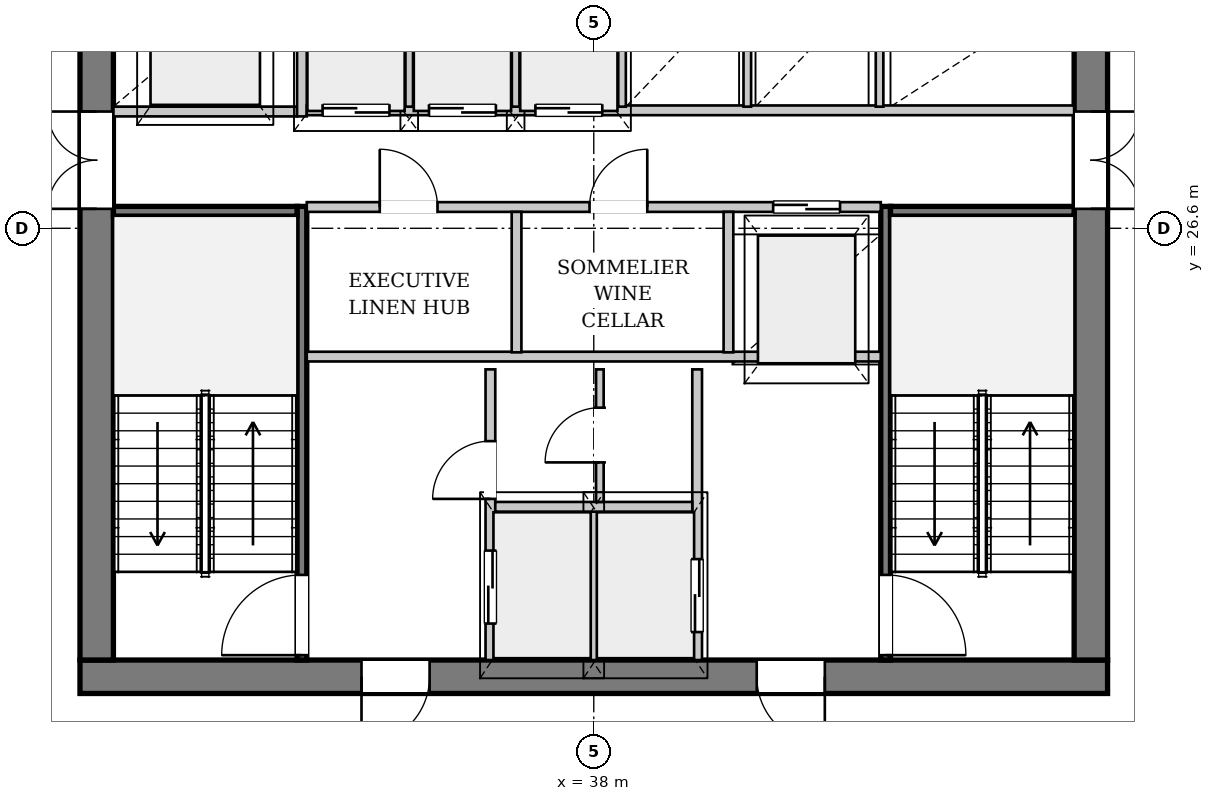
"""IFC4 building model, lengths in metres.
Left out: names, types, materials, properties, quantities, classifications, styles, units other than length and angle.
Written with IfcOpenShell. Run it as: python <this file> out.ifc"""

import sys

from ifc_helpers import new_model, si_unit, direction, frame, frame_2d, origin, place, context, subcontext, project, spatial, rectangle, extrude, source, transform, mapped, element, fill, save


model = new_model("IFC4")
c1 = context("Model", 3, precision=1e-05, world=origin(), true_north=direction((0.0, 1.0)))
c2 = subcontext(c1, "Body", "Model", "MODEL_VIEW")
j1 = project(units=[si_unit("LENGTHUNIT", "METRE"), si_unit("PLANEANGLEUNIT", "RADIAN")], contexts=[c1])
p1 = place(None, origin())
s1 = spatial("IfcSite", under=j1, at=p1, CompositionType="ELEMENT")
p2 = place(p1, origin())
s2 = spatial("IfcBuilding", under=s1, at=p2, CompositionType="ELEMENT")
p3 = place(p2, frame((0.0, 0.0, 171.45)))
s3 = spatial("IfcBuildingStorey", under=s2, at=p3, CompositionType="ELEMENT", Elevation=171.45)
p4 = place(p3, frame((52.993, 20.473, 0.0), z_axis=(0.0, 0.0, 1.0), x_axis=(-0.643470383852, -0.765471008664, 0.0)))
e1 = element("IfcWall", 1, at=p4, inside=s3, PredefinedType="SOLIDWALL", context=c2, shape_type="SweptSolid", body=[
    extrude(rectangle(XDim=23.409, YDim=0.32, at=frame_2d((11.705, 0.0))), origin(), (0.0, 0.0, 1.0), 2.722),
])
p5 = place(p4, frame((6.741, 0.0, 0.0)))
e2 = element("IfcOpeningElement", 2, at=p5, cuts=e1, PredefinedType="OPENING", context=c2, shape_type="SweptSolid", body=[
    extrude(rectangle(XDim=1.5, YDim=2.3, at=frame_2d((0.75, 1.15))), frame((0.0, 0.17, 0.0), z_axis=(0.0, -1.0, 0.0), x_axis=(1.0, 0.0, 0.0)), (0.0, 0.0, 1.0), 0.34),
])
p6 = place(p4, frame((16.023, 0.0, 0.252)))
e3 = element("IfcOpeningElement", 3, at=p6, cuts=e1, PredefinedType="OPENING", context=c2, shape_type="SweptSolid", body=[
    extrude(rectangle(XDim=2.6, YDim=2.35, at=frame_2d((1.3, 1.175))), frame((0.0, 0.17, 0.0), z_axis=(0.0, -1.0, 0.0), x_axis=(1.0, 0.0, 0.0)), (0.0, 0.0, 1.0), 0.34),
])
p7 = place(p3, frame((46.45, 19.225, 0.0), z_axis=(0.0, 0.0, 1.0), x_axis=(-1.0, 0.0, 0.0)))
e4 = element("IfcWall", 4, at=p7, inside=s3, PredefinedType="SHEAR", context=c2, shape_type="SweptSolid", body=[
    extrude(rectangle(XDim=16.9, YDim=0.55, at=frame_2d((8.45, 0.0))), origin(), (0.0, 0.0, 1.0), 3.33),
])
p8 = place(p7, frame((4.65, 0.0, 0.0)))
e5 = element("IfcOpeningElement", 5, at=p8, cuts=e4, PredefinedType="OPENING", context=c2, shape_type="SweptSolid", body=[
    extrude(rectangle(XDim=1.12, YDim=2.25, at=frame_2d((0.56, 1.125))), frame((0.0, 0.285, 0.0), z_axis=(0.0, -1.0, 0.0), x_axis=(1.0, 0.0, 0.0)), (0.0, 0.0, 1.0), 0.57),
])
p9 = place(p7, frame((11.15, 0.0, 0.0)))
e6 = element("IfcOpeningElement", 6, at=p9, cuts=e4, PredefinedType="OPENING", context=c2, shape_type="SweptSolid", body=[
    extrude(rectangle(XDim=1.12, YDim=2.25, at=frame_2d((0.56, 1.125))), frame((0.0, 0.285, 0.0), z_axis=(0.0, -1.0, 0.0), x_axis=(1.0, 0.0, 0.0)), (0.0, 0.0, 1.0), 0.57),
])
p10 = place(p3, frame((29.825, 19.5, 0.0), z_axis=(0.0, 0.0, 1.0), x_axis=(0.0, 1.0, 0.0)))
e7 = element("IfcWall", 7, at=p10, inside=s3, PredefinedType="SHEAR", context=c2, shape_type="SweptSolid", body=[
    extrude(rectangle(XDim=14.2, YDim=0.55, at=frame_2d((7.1, 0.0))), origin(), (0.0, 0.0, 1.0), 3.33),
])
p11 = place(p10, frame((7.42, 0.0, 0.0)))
e8 = element("IfcOpeningElement", 8, at=p11, cuts=e7, PredefinedType="OPENING", context=c2, shape_type="SweptSolid", body=[
    extrude(rectangle(XDim=1.6, YDim=2.2, at=frame_2d((0.8, 1.1))), frame((0.0, 0.285, 0.0), z_axis=(0.0, -1.0, 0.0), x_axis=(1.0, 0.0, 0.0)), (0.0, 0.0, 1.0), 0.57),
])
p12 = place(p3, frame((46.175, 33.7, 0.0), z_axis=(0.0, 0.0, 1.0), x_axis=(0.0, -1.0, 0.0)))
e9 = element("IfcWall", 9, at=p12, inside=s3, PredefinedType="SHEAR", context=c2, shape_type="SweptSolid", body=[
    extrude(rectangle(XDim=14.2, YDim=0.55, at=frame_2d((7.1, 0.0))), origin(), (0.0, 0.0, 1.0), 3.33),
])
p13 = place(p12, frame((5.18, 0.0, 0.0)))
e10 = element("IfcOpeningElement", 10, at=p13, cuts=e9, PredefinedType="OPENING", context=c2, shape_type="SweptSolid", body=[
    extrude(rectangle(XDim=1.6, YDim=2.2, at=frame_2d((0.8, 1.1))), frame((0.0, 0.285, 0.0), z_axis=(0.0, -1.0, 0.0), x_axis=(1.0, 0.0, 0.0)), (0.0, 0.0, 1.0), 0.57),
])
p14 = place(p12, frame((2.05, 0.0, 0.0)))
e11 = element("IfcOpeningElement", 11, at=p14, cuts=e9, PredefinedType="OPENING", context=c2, shape_type="SweptSolid", body=[
    extrude(rectangle(XDim=0.95, YDim=2.1, at=frame_2d((0.475, 1.05))), frame((0.0, 0.285, 0.0), z_axis=(0.0, -1.0, 0.0), x_axis=(1.0, 0.0, 0.0)), (0.0, 0.0, 1.0), 0.57),
])
p15 = place(p3, frame((33.2, 19.5, 0.0), z_axis=(0.0, 0.0, 1.0), x_axis=(0.0, 1.0, 0.0)))
e12 = element("IfcWall", 12, at=p15, inside=s3, PredefinedType="PARTITIONING", context=c2, shape_type="SweptSolid", body=[
    extrude(rectangle(XDim=7.46, YDim=0.16, at=frame_2d((3.73, 0.0))), origin(), (0.0, 0.0, 1.0), 3.33),
])
p16 = place(p15, frame((0.08, 0.0, 0.0)))
e13 = element("IfcOpeningElement", 13, at=p16, cuts=e12, PredefinedType="OPENING", context=c2, shape_type="SweptSolid", body=[
    extrude(rectangle(XDim=1.32, YDim=2.2, at=frame_2d((0.66, 1.1))), frame((0.0, 0.09, 0.0), z_axis=(0.0, -1.0, 0.0), x_axis=(1.0, 0.0, 0.0)), (0.0, 0.0, 1.0), 0.18),
])
p17 = place(p3, frame((30.1, 26.88, 0.0), z_axis=(0.0, 0.0, 1.0), x_axis=(1.0, 0.0, 0.0)))
e14 = element("IfcWall", 14, at=p17, inside=s3, PredefinedType="PARTITIONING", context=c2, shape_type="SweptSolid", body=[
    extrude(rectangle(XDim=3.02, YDim=0.16, at=frame_2d((1.51, 0.0))), origin(), (0.0, 0.0, 1.0), 3.33),
])
p18 = place(p3, frame((42.8, 26.96, 0.0), z_axis=(0.0, 0.0, 1.0), x_axis=(0.0, -1.0, 0.0)))
e15 = element("IfcWall", 15, at=p18, inside=s3, PredefinedType="PARTITIONING", context=c2, shape_type="SweptSolid", body=[
    extrude(rectangle(XDim=7.46, YDim=0.16, at=frame_2d((3.73, 0.0))), origin(), (0.0, 0.0, 1.0), 3.33),
])
p19 = place(p18, frame((6.06, 0.0, 0.0)))
e16 = element("IfcOpeningElement", 16, at=p19, cuts=e15, PredefinedType="OPENING", context=c2, shape_type="SweptSolid", body=[
    extrude(rectangle(XDim=1.32, YDim=2.2, at=frame_2d((0.66, 1.1))), frame((0.0, 0.09, 0.0), z_axis=(0.0, -1.0, 0.0), x_axis=(1.0, 0.0, 0.0)), (0.0, 0.0, 1.0), 0.18),
])
p20 = place(p3, frame((42.88, 26.88, 0.0), z_axis=(0.0, 0.0, 1.0), x_axis=(1.0, 0.0, 0.0)))
e17 = element("IfcWall", 17, at=p20, inside=s3, PredefinedType="PARTITIONING", context=c2, shape_type="SweptSolid", body=[
    extrude(rectangle(XDim=3.02, YDim=0.16, at=frame_2d((1.51, 0.0))), origin(), (0.0, 0.0, 1.0), 3.33),
])
p21 = place(p3, frame((36.3, 19.5, 0.0), z_axis=(0.0, 0.0, 1.0), x_axis=(0.0, 1.0, 0.0)))
e18 = element("IfcWall", 18, at=p21, inside=s3, PredefinedType="PARTITIONING", context=c2, shape_type="SweptSolid", body=[
    extrude(rectangle(XDim=4.78, YDim=0.16, at=frame_2d((2.39, 0.0))), origin(), (0.0, 0.0, 1.0), 3.33),
])
p22 = place(p21, frame((0.6, 0.0, 0.0)))
e19 = element("IfcOpeningElement", 19, at=p22, cuts=e18, PredefinedType="OPENING", context=c2, shape_type="SweptSolid", body=[
    extrude(rectangle(XDim=1.2, YDim=2.2, at=frame_2d((0.6, 1.1))), frame((0.0, 0.09, 0.0), z_axis=(0.0, -1.0, 0.0), x_axis=(1.0, 0.0, 0.0)), (0.0, 0.0, 1.0), 0.18),
])
p23 = place(p21, frame((2.65, 0.0, 0.0)))
e20 = element("IfcOpeningElement", 20, at=p23, cuts=e18, PredefinedType="OPENING", context=c2, shape_type="SweptSolid", body=[
    extrude(rectangle(XDim=0.95, YDim=2.1, at=frame_2d((0.475, 1.05))), frame((0.0, 0.09, 0.0), z_axis=(0.0, -1.0, 0.0), x_axis=(1.0, 0.0, 0.0)), (0.0, 0.0, 1.0), 0.18),
])
p24 = place(p3, frame((39.7, 24.28, 0.0), z_axis=(0.0, 0.0, 1.0), x_axis=(0.0, -1.0, 0.0)))
e21 = element("IfcWall", 21, at=p24, inside=s3, PredefinedType="PARTITIONING", context=c2, shape_type="SweptSolid", body=[
    extrude(rectangle(XDim=4.78, YDim=0.16, at=frame_2d((2.39, 0.0))), origin(), (0.0, 0.0, 1.0), 3.33),
])
p25 = place(p24, frame((3.12, 0.0, 0.0)))
e22 = element("IfcOpeningElement", 22, at=p25, cuts=e21, PredefinedType="OPENING", context=c2, shape_type="SweptSolid", body=[
    extrude(rectangle(XDim=1.2, YDim=2.2, at=frame_2d((0.6, 1.1))), frame((0.0, 0.09, 0.0), z_axis=(0.0, -1.0, 0.0), x_axis=(1.0, 0.0, 0.0)), (0.0, 0.0, 1.0), 0.18),
])
p26 = place(p3, frame((38.0, 19.5, 0.0), z_axis=(0.0, 0.0, 1.0), x_axis=(0.0, 1.0, 0.0)))
e23 = element("IfcWall", 23, at=p26, inside=s3, PredefinedType="PARTITIONING", context=c2, shape_type="SweptSolid", body=[
    extrude(rectangle(XDim=2.46, YDim=0.125, at=frame_2d((1.23, 0.0))), origin(), (0.0, 0.0, 1.0), 3.33),
])
p27 = place(p3, frame((36.38, 22.02, 0.0), z_axis=(0.0, 0.0, 1.0), x_axis=(1.0, 0.0, 0.0)))
e24 = element("IfcWall", 24, at=p27, inside=s3, PredefinedType="PARTITIONING", context=c2, shape_type="SweptSolid", body=[
    extrude(rectangle(XDim=3.24, YDim=0.16, at=frame_2d((1.62, 0.0))), origin(), (0.0, 0.0, 1.0), 3.33),
])
p28 = place(p3, frame((33.28, 24.49, 0.0), z_axis=(0.0, 0.0, 1.0), x_axis=(1.0, 0.0, 0.0)))
e25 = element("IfcWall", 25, at=p28, inside=s3, PredefinedType="PARTITIONING", context=c2, shape_type="SweptSolid", body=[
    extrude(rectangle(XDim=9.44, YDim=0.16, at=frame_2d((4.72, 0.0))), origin(), (0.0, 0.0, 1.0), 3.33),
])
p29 = place(p3, frame((38.1, 22.1, 0.0), z_axis=(0.0, 0.0, 1.0), x_axis=(0.0, 1.0, 0.0)))
e26 = element("IfcWall", 26, at=p29, inside=s3, PredefinedType="PARTITIONING", context=c2, shape_type="SweptSolid", body=[
    extrude(rectangle(XDim=2.18, YDim=0.125, at=frame_2d((1.09, 0.0))), origin(), (0.0, 0.0, 1.0), 3.33),
])
p30 = place(p29, frame((0.65, 0.0, 0.0)))
e27 = element("IfcOpeningElement", 27, at=p30, cuts=e26, PredefinedType="OPENING", context=c2, shape_type="SweptSolid", body=[
    extrude(rectangle(XDim=0.9, YDim=2.1, at=frame_2d((0.45, 1.05))), frame((0.0, 0.073, 0.0), z_axis=(0.0, -1.0, 0.0), x_axis=(1.0, 0.0, 0.0)), (0.0, 0.0, 1.0), 0.145),
])
p31 = place(p3, frame((30.1, 28.52, 0.0), z_axis=(0.0, 0.0, 1.0), x_axis=(1.0, 0.0, 0.0)))
e28 = element("IfcWall", 28, at=p31, inside=s3, PredefinedType="PARTITIONING", context=c2, shape_type="SweptSolid", body=[
    extrude(rectangle(XDim=3.02, YDim=0.16, at=frame_2d((1.51, 0.0))), origin(), (0.0, 0.0, 1.0), 3.33),
])
p32 = place(p3, frame((33.2, 28.44, 0.0), z_axis=(0.0, 0.0, 1.0), x_axis=(0.0, 1.0, 0.0)))
e29 = element("IfcWall", 29, at=p32, inside=s3, PredefinedType="PARTITIONING", context=c2, shape_type="SweptSolid", body=[
    extrude(rectangle(XDim=5.26, YDim=0.16, at=frame_2d((2.63, 0.0))), origin(), (0.0, 0.0, 1.0), 3.33),
])
p33 = place(p3, frame((33.28, 26.95, 0.0), z_axis=(0.0, 0.0, 1.0), x_axis=(1.0, 0.0, 0.0)))
e30 = element("IfcWall", 30, at=p33, inside=s3, PredefinedType="PARTITIONING", context=c2, shape_type="SweptSolid", body=[
    extrude(rectangle(XDim=9.44, YDim=0.16, at=frame_2d((4.72, 0.0))), origin(), (0.0, 0.0, 1.0), 3.33),
])
p34 = place(p33, frame((1.2, 0.0, 0.0)))
e31 = element("IfcOpeningElement", 31, at=p34, cuts=e30, PredefinedType="OPENING", context=c2, shape_type="SweptSolid", body=[
    extrude(rectangle(XDim=0.95, YDim=2.1, at=frame_2d((0.475, 1.05))), frame((0.0, 0.09, 0.0), z_axis=(0.0, -1.0, 0.0), x_axis=(1.0, 0.0, 0.0)), (0.0, 0.0, 1.0), 0.18),
])
p35 = place(p33, frame((4.65, 0.0, 0.0)))
e32 = element("IfcOpeningElement", 32, at=p35, cuts=e30, PredefinedType="OPENING", context=c2, shape_type="SweptSolid", body=[
    extrude(rectangle(XDim=0.95, YDim=2.1, at=frame_2d((0.475, 1.05))), frame((0.0, 0.09, 0.0), z_axis=(0.0, -1.0, 0.0), x_axis=(1.0, 0.0, 0.0)), (0.0, 0.0, 1.0), 0.18),
])
p36 = place(p33, frame((7.67, 0.0, 0.0)))
e33 = element("IfcOpeningElement", 33, at=p36, cuts=e30, PredefinedType="OPENING", context=c2, shape_type="SweptSolid", body=[
    extrude(rectangle(XDim=1.1, YDim=2.2, at=frame_2d((0.55, 1.1))), frame((0.0, 0.09, 0.0), z_axis=(0.0, -1.0, 0.0), x_axis=(1.0, 0.0, 0.0)), (0.0, 0.0, 1.0), 0.18),
])
for number, where, z_axis, x_axis in (
    (34, (36.73, 24.56, 0.0), (0.0, 0.0, 1.0), (0.0, 1.0, 0.0)),
    (35, (40.215, 24.56, 0.0), (0.0, 0.0, 1.0), (0.0, 1.0, 0.0)),
):
    element("IfcWall", number, at=place(p3, frame(where, z_axis=z_axis, x_axis=x_axis)), inside=s3, PredefinedType="PARTITIONING", context=c2, shape_type="SweptSolid", body=[
        extrude(rectangle(XDim=2.31, YDim=0.16, at=frame_2d((1.155, 0.0))), origin(), (0.0, 0.0, 1.0), 3.33),
    ])
p37 = place(p3, frame((33.28, 28.54, 0.0), z_axis=(0.0, 0.0, 1.0), x_axis=(1.0, 0.0, 0.0)))
e36 = element("IfcWall", 36, at=p37, inside=s3, PredefinedType="PARTITIONING", context=c2, shape_type="SweptSolid", body=[
    extrude(rectangle(XDim=12.62, YDim=0.16, at=frame_2d((6.31, 0.0))), origin(), (0.0, 0.0, 1.0), 3.33),
])
p38 = place(p37, frame((0.26, 0.0, 0.0)))
e37 = element("IfcOpeningElement", 37, at=p38, cuts=e36, PredefinedType="OPENING", context=c2, shape_type="SweptSolid", body=[
    extrude(rectangle(XDim=1.1, YDim=2.2, at=frame_2d((0.55, 1.1))), frame((0.0, 0.09, 0.0), z_axis=(0.0, -1.0, 0.0), x_axis=(1.0, 0.0, 0.0)), (0.0, 0.0, 1.0), 0.18),
])
p39 = place(p37, frame((2.01, 0.0, 0.0)))
e38 = element("IfcOpeningElement", 38, at=p39, cuts=e36, PredefinedType="OPENING", context=c2, shape_type="SweptSolid", body=[
    extrude(rectangle(XDim=1.1, YDim=2.2, at=frame_2d((0.55, 1.1))), frame((0.0, 0.09, 0.0), z_axis=(0.0, -1.0, 0.0), x_axis=(1.0, 0.0, 0.0)), (0.0, 0.0, 1.0), 0.18),
])
p40 = place(p37, frame((3.76, 0.0, 0.0)))
e39 = element("IfcOpeningElement", 39, at=p40, cuts=e36, PredefinedType="OPENING", context=c2, shape_type="SweptSolid", body=[
    extrude(rectangle(XDim=1.1, YDim=2.2, at=frame_2d((0.55, 1.1))), frame((0.0, 0.09, 0.0), z_axis=(0.0, -1.0, 0.0), x_axis=(1.0, 0.0, 0.0)), (0.0, 0.0, 1.0), 0.18),
])
for number, where, z_axis, x_axis in (
    (40, (34.965, 28.6, 0.0), (0.0, 0.0, 1.0), (0.0, 1.0, 0.0)),
    (41, (36.715, 28.6, 0.0), (0.0, 0.0, 1.0), (0.0, 1.0, 0.0)),
    (42, (38.465, 28.6, 0.0), (0.0, 0.0, 1.0), (0.0, 1.0, 0.0)),
    (43, (40.525, 28.6, 0.0), (0.0, 0.0, 1.0), (0.0, 1.0, 0.0)),
    (44, (42.7, 28.6, 0.0), (0.0, 0.0, 1.0), (0.0, 1.0, 0.0)),
):
    element("IfcWall", number, at=place(p3, frame(where, z_axis=z_axis, x_axis=x_axis)), inside=s3, PredefinedType="PARTITIONING", context=c2, shape_type="SweptSolid", body=[
        extrude(rectangle(XDim=1.92, YDim=0.125, at=frame_2d((0.96, 0.0))), origin(), (0.0, 0.0, 1.0), 3.33),
    ])
m1 = source(origin(), c2, "Body", "SweptSolid", [
    extrude(rectangle(XDim=1.12, YDim=2.25, at=frame_2d((0.56, 1.125))), frame((0.0, 0.025, 0.0), z_axis=(0.0, -1.0, 0.0), x_axis=(1.0, 0.0, 0.0)), (0.0, 0.0, 1.0), 0.05),
])
p41 = place(p8, origin())
e45 = element("IfcDoor", 45, at=p41, inside=s3, OperationType="SINGLE_SWING_LEFT", PredefinedType="DOOR", context=c2, shape_type="MappedRepresentation", body=[
    mapped(m1, transform((0.0, 0.0, 0.0), x_axis=(1.0, 0.0, 0.0), y_axis=(0.0, 1.0, 0.0), z_axis=(0.0, 0.0, 1.0), scale=1.0)),
])
fill(e5, e45)
p42 = place(p9, origin())
e46 = element("IfcDoor", 46, at=p42, inside=s3, OperationType="SINGLE_SWING_RIGHT", PredefinedType="DOOR", context=c2, shape_type="MappedRepresentation", body=[
    mapped(m1, transform((0.0, 0.0, 0.0), x_axis=(1.0, 0.0, 0.0), y_axis=(0.0, 1.0, 0.0), z_axis=(0.0, 0.0, 1.0), scale=1.0)),
])
fill(e6, e46)
m2 = source(origin(), c2, "Body", "SweptSolid", [
    extrude(rectangle(XDim=1.6, YDim=2.2, at=frame_2d((0.8, 1.1))), frame((0.0, 0.025, 0.0), z_axis=(0.0, -1.0, 0.0), x_axis=(1.0, 0.0, 0.0)), (0.0, 0.0, 1.0), 0.05),
])
p43 = place(p11, origin())
e47 = element("IfcDoor", 47, at=p43, inside=s3, OperationType="DOUBLE_DOOR_SINGLE_SWING", PredefinedType="DOOR", context=c2, shape_type="MappedRepresentation", body=[
    mapped(m2, transform((0.0, 0.0, 0.0), x_axis=(1.0, 0.0, 0.0), y_axis=(0.0, 1.0, 0.0), z_axis=(0.0, 0.0, 1.0), scale=1.0)),
])
fill(e8, e47)
p44 = place(p13, origin())
e48 = element("IfcDoor", 48, at=p44, inside=s3, OperationType="DOUBLE_DOOR_SINGLE_SWING", PredefinedType="DOOR", context=c2, shape_type="MappedRepresentation", body=[
    mapped(m2, transform((0.0, 0.0, 0.0), x_axis=(1.0, 0.0, 0.0), y_axis=(0.0, 1.0, 0.0), z_axis=(0.0, 0.0, 1.0), scale=1.0)),
])
fill(e10, e48)
m3 = source(origin(), c2, "Body", "SweptSolid", [
    extrude(rectangle(XDim=1.32, YDim=2.2, at=frame_2d((0.66, 1.1))), frame((0.0, 0.025, 0.0), z_axis=(0.0, -1.0, 0.0), x_axis=(1.0, 0.0, 0.0)), (0.0, 0.0, 1.0), 0.05),
])
p45 = place(p16, origin())
e49 = element("IfcDoor", 49, at=p45, inside=s3, OperationType="SINGLE_SWING_LEFT", PredefinedType="DOOR", context=c2, shape_type="MappedRepresentation", body=[
    mapped(m3, transform((0.0, 0.0, 0.0), x_axis=(1.0, 0.0, 0.0), y_axis=(0.0, 1.0, 0.0), z_axis=(0.0, 0.0, 1.0), scale=1.0)),
])
fill(e13, e49)
p46 = place(p19, origin())
e50 = element("IfcDoor", 50, at=p46, inside=s3, OperationType="SINGLE_SWING_RIGHT", PredefinedType="DOOR", context=c2, shape_type="MappedRepresentation", body=[
    mapped(m3, transform((0.0, 0.0, 0.0), x_axis=(1.0, 0.0, 0.0), y_axis=(0.0, 1.0, 0.0), z_axis=(0.0, 0.0, 1.0), scale=1.0)),
])
fill(e16, e50)
m4 = source(origin(), c2, "Body", "SweptSolid", [
    extrude(rectangle(XDim=1.2, YDim=2.2, at=frame_2d((0.6, 1.1))), frame((0.0, 0.025, 0.0), z_axis=(0.0, -1.0, 0.0), x_axis=(1.0, 0.0, 0.0)), (0.0, 0.0, 1.0), 0.05),
])
p47 = place(p22, origin())
e51 = element("IfcDoor", 51, at=p47, inside=s3, OperationType="DOUBLE_DOOR_SLIDING", PredefinedType="DOOR", context=c2, shape_type="MappedRepresentation", body=[
    mapped(m4, transform((0.0, 0.0, 0.0), x_axis=(1.0, 0.0, 0.0), y_axis=(0.0, 1.0, 0.0), z_axis=(0.0, 0.0, 1.0), scale=1.0)),
])
fill(e19, e51)
m5 = source(origin(), c2, "Body", "SweptSolid", [
    extrude(rectangle(XDim=0.95, YDim=2.1, at=frame_2d((0.475, 1.05))), frame((0.0, 0.025, 0.0), z_axis=(0.0, -1.0, 0.0), x_axis=(1.0, 0.0, 0.0)), (0.0, 0.0, 1.0), 0.05),
])
p48 = place(p23, origin())
e52 = element("IfcDoor", 52, at=p48, inside=s3, OperationType="SINGLE_SWING_LEFT", PredefinedType="DOOR", context=c2, shape_type="MappedRepresentation", body=[
    mapped(m5, transform((0.0, 0.0, 0.0), x_axis=(1.0, 0.0, 0.0), y_axis=(0.0, 1.0, 0.0), z_axis=(0.0, 0.0, 1.0), scale=1.0)),
])
fill(e20, e52)
m6 = source(origin(), c2, "Body", "SweptSolid", [
    extrude(rectangle(XDim=0.9, YDim=2.1, at=frame_2d((0.45, 1.05))), frame((0.0, 0.025, 0.0), z_axis=(0.0, -1.0, 0.0), x_axis=(1.0, 0.0, 0.0)), (0.0, 0.0, 1.0), 0.05),
])
p49 = place(p30, origin())
e53 = element("IfcDoor", 53, at=p49, inside=s3, OperationType="SINGLE_SWING_LEFT", PredefinedType="DOOR", context=c2, shape_type="MappedRepresentation", body=[
    mapped(m6, transform((0.0, 0.0, 0.0), x_axis=(1.0, 0.0, 0.0), y_axis=(0.0, 1.0, 0.0), z_axis=(0.0, 0.0, 1.0), scale=1.0)),
])
fill(e27, e53)
p50 = place(p25, origin())
e54 = element("IfcDoor", 54, at=p50, inside=s3, OperationType="DOUBLE_DOOR_SLIDING", PredefinedType="DOOR", context=c2, shape_type="MappedRepresentation", body=[
    mapped(m4, transform((0.0, 0.0, 0.0), x_axis=(1.0, 0.0, 0.0), y_axis=(0.0, 1.0, 0.0), z_axis=(0.0, 0.0, 1.0), scale=1.0)),
])
fill(e22, e54)
p51 = place(p34, origin())
e55 = element("IfcDoor", 55, at=p51, inside=s3, OperationType="SINGLE_SWING_LEFT", PredefinedType="DOOR", context=c2, shape_type="MappedRepresentation", body=[
    mapped(m5, transform((0.0, 0.0, 0.0), x_axis=(1.0, 0.0, 0.0), y_axis=(0.0, 1.0, 0.0), z_axis=(0.0, 0.0, 1.0), scale=1.0)),
])
fill(e31, e55)
p52 = place(p35, origin())
e56 = element("IfcDoor", 56, at=p52, inside=s3, OperationType="SINGLE_SWING_RIGHT", PredefinedType="DOOR", context=c2, shape_type="MappedRepresentation", body=[
    mapped(m5, transform((0.0, 0.0, 0.0), x_axis=(1.0, 0.0, 0.0), y_axis=(0.0, 1.0, 0.0), z_axis=(0.0, 0.0, 1.0), scale=1.0)),
])
fill(e32, e56)
m7 = source(origin(), c2, "Body", "SweptSolid", [
    extrude(rectangle(XDim=1.1, YDim=2.2, at=frame_2d((0.55, 1.1))), frame((0.0, 0.025, 0.0), z_axis=(0.0, -1.0, 0.0), x_axis=(1.0, 0.0, 0.0)), (0.0, 0.0, 1.0), 0.05),
])
p53 = place(p36, origin())
e57 = element("IfcDoor", 57, at=p53, inside=s3, OperationType="DOUBLE_DOOR_SLIDING", PredefinedType="DOOR", context=c2, shape_type="MappedRepresentation", body=[
    mapped(m7, transform((0.0, 0.0, 0.0), x_axis=(1.0, 0.0, 0.0), y_axis=(0.0, 1.0, 0.0), z_axis=(0.0, 0.0, 1.0), scale=1.0)),
])
fill(e33, e57)
p54 = place(p38, origin())
e58 = element("IfcDoor", 58, at=p54, inside=s3, OperationType="DOUBLE_DOOR_SLIDING", PredefinedType="DOOR", context=c2, shape_type="MappedRepresentation", body=[
    mapped(m7, transform((0.0, 0.0, 0.0), x_axis=(1.0, 0.0, 0.0), y_axis=(0.0, 1.0, 0.0), z_axis=(0.0, 0.0, 1.0), scale=1.0)),
])
fill(e37, e58)
p55 = place(p39, origin())
e59 = element("IfcDoor", 59, at=p55, inside=s3, OperationType="DOUBLE_DOOR_SLIDING", PredefinedType="DOOR", context=c2, shape_type="MappedRepresentation", body=[
    mapped(m7, transform((0.0, 0.0, 0.0), x_axis=(1.0, 0.0, 0.0), y_axis=(0.0, 1.0, 0.0), z_axis=(0.0, 0.0, 1.0), scale=1.0)),
])
fill(e38, e59)
p56 = place(p40, origin())
e60 = element("IfcDoor", 60, at=p56, inside=s3, OperationType="DOUBLE_DOOR_SLIDING", PredefinedType="DOOR", context=c2, shape_type="MappedRepresentation", body=[
    mapped(m7, transform((0.0, 0.0, 0.0), x_axis=(1.0, 0.0, 0.0), y_axis=(0.0, 1.0, 0.0), z_axis=(0.0, 0.0, 1.0), scale=1.0)),
])
fill(e39, e60)
save(model, sys.argv[1])
